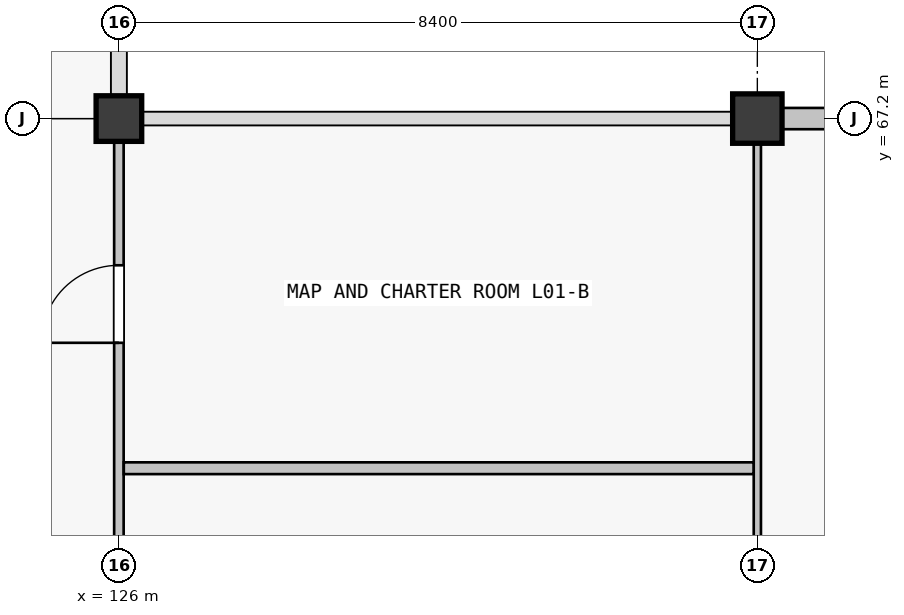
"""IFC4 building model, lengths in metres.
Left out: names, types, materials, properties, quantities, classifications, styles, units other than length and angle.
Written with IfcOpenShell. Run it as: python <this file> out.ifc"""

import sys

from ifc_helpers import new_model, si_unit, direction, frame, frame_2d, origin, origin_2d, place, context, subcontext, project, spatial, rectangle, extrude, element, fill, save


model = new_model("IFC4")
c1 = context("Model", 3, precision=1e-05, world=origin(), true_north=direction((0.0, 1.0)))
c2 = subcontext(c1, "Body", "Model", "MODEL_VIEW")
j1 = project(units=[si_unit("LENGTHUNIT", "METRE"), si_unit("PLANEANGLEUNIT", "RADIAN")], contexts=[c1])
p1 = place(None, origin())
s1 = spatial("IfcSite", under=j1, at=p1, CompositionType="ELEMENT")
p2 = place(p1, origin())
s2 = spatial("IfcBuilding", under=s1, at=p2, CompositionType="ELEMENT")
p3 = place(p2, frame((0.0, 0.0, 5.76)))
s3 = spatial("IfcBuildingStorey", under=s2, at=p3, CompositionType="ELEMENT", Elevation=5.76)
p4 = place(p3, frame((126.0, 67.2, 0.0), z_axis=(0.0, 0.0, 1.0), x_axis=(1.0, 0.0, 0.0)))
e1 = element("IfcColumn", 1, at=p4, inside=s3, PredefinedType="COLUMN", context=c2, shape_type="SweptSolid", body=[
    extrude(rectangle(XDim=0.6, YDim=0.6, at=origin_2d()), origin(), (0.0, 0.0, 1.0), 4.5),
])
p5 = place(p3, frame((134.4, 67.2, 0.0), z_axis=(0.0, 0.0, 1.0), x_axis=(1.0, 0.0, 0.0)))
e2 = element("IfcColumn", 2, at=p5, inside=s3, PredefinedType="COLUMN", context=c2, shape_type="SweptSolid", body=[
    extrude(rectangle(XDim=0.65, YDim=0.65, at=origin_2d()), origin(), (0.0, 0.0, 1.0), 4.5),
])
p6 = place(p3, frame((134.726, 67.2, 0.0), z_axis=(0.0, 0.0, 1.0), x_axis=(1.0, 0.0, 0.0)))
e3 = element("IfcWall", 3, at=p6, inside=s3, PredefinedType="SOLIDWALL", context=c2, shape_type="SweptSolid", body=[
    extrude(rectangle(XDim=7.723, YDim=0.28, at=frame_2d((3.861, 0.0))), origin(), (0.0, 0.0, 1.0), 3.4),
])
p7 = place(p6, frame((2.662, 0.0, 0.9)))
e4 = element("IfcOpeningElement", 4, at=p7, cuts=e3, PredefinedType="OPENING", context=c2, shape_type="SweptSolid", body=[
    extrude(rectangle(XDim=2.4, YDim=2.25, at=frame_2d((1.2, 1.125))), frame((0.0, 0.14, 0.0), z_axis=(0.0, -1.0, 0.0), x_axis=(1.0, 0.0, 0.0)), (0.0, 0.0, 1.0), 0.28),
])
p8 = place(p3, frame((126.0, 59.177, 0.0), z_axis=(0.0, 0.0, 1.0), x_axis=(0.0, 1.0, 0.0)))
e5 = element("IfcWall", 5, at=p8, inside=s3, PredefinedType="PARTITIONING", context=c2, shape_type="SweptSolid", body=[
    extrude(rectangle(XDim=7.721, YDim=0.125, at=frame_2d((3.86, 0.0))), origin(), (0.0, 0.0, 1.0), 2.4),
])
p9 = place(p8, frame((1.143, 0.0, 0.0)))
e6 = element("IfcOpeningElement", 6, at=p9, cuts=e5, PredefinedType="OPENING", context=c2, shape_type="SweptSolid", body=[
    extrude(rectangle(XDim=1.04, YDim=2.2, at=frame_2d((0.52, 1.1))), frame((0.0, 0.062, 0.0), z_axis=(0.0, -1.0, 0.0), x_axis=(1.0, 0.0, 0.0)), (0.0, 0.0, 1.0), 0.125),
])
p10 = place(p8, frame((5.073, 0.0, 0.0)))
e7 = element("IfcOpeningElement", 7, at=p10, cuts=e5, PredefinedType="OPENING", context=c2, shape_type="SweptSolid", body=[
    extrude(rectangle(XDim=1.02, YDim=2.2, at=frame_2d((0.51, 1.1))), frame((0.0, 0.062, 0.0), z_axis=(0.0, -1.0, 0.0), x_axis=(1.0, 0.0, 0.0)), (0.0, 0.0, 1.0), 0.125),
])
p11 = place(p3, frame((134.4, 59.152, 0.0), z_axis=(0.0, 0.0, 1.0), x_axis=(0.0, 1.0, 0.0)))
e8 = element("IfcWall", 8, at=p11, inside=s3, PredefinedType="PARTITIONING", context=c2, shape_type="SweptSolid", body=[
    extrude(rectangle(XDim=7.721, YDim=0.095, at=frame_2d((3.86, 0.0))), origin(), (0.0, 0.0, 1.0), 2.4),
])
p12 = place(p3, frame((126.064, 62.6, 0.0), z_axis=(0.0, 0.0, 1.0), x_axis=(1.0, 0.0, 0.0)))
e9 = element("IfcWall", 9, at=p12, inside=s3, PredefinedType="PARTITIONING", context=c2, shape_type="SweptSolid", body=[
    extrude(rectangle(XDim=8.286, YDim=0.155, at=frame_2d((4.143, 0.0))), origin(), (0.0, 0.0, 1.0), 2.4),
])
p13 = place(p10, origin())
e10 = element("IfcDoor", 10, at=p13, inside=s3, OperationType="SINGLE_SWING_LEFT", PredefinedType="DOOR", context=c2, shape_type="SweptSolid", body=[
    extrude(rectangle(XDim=1.02, YDim=2.2, at=frame_2d((0.51, 1.1))), frame((0.0, 0.025, 0.0), z_axis=(0.0, -1.0, 0.0), x_axis=(1.0, 0.0, 0.0)), (0.0, 0.0, 1.0), 0.05),
])
fill(e7, e10)
save(model, sys.argv[1])
